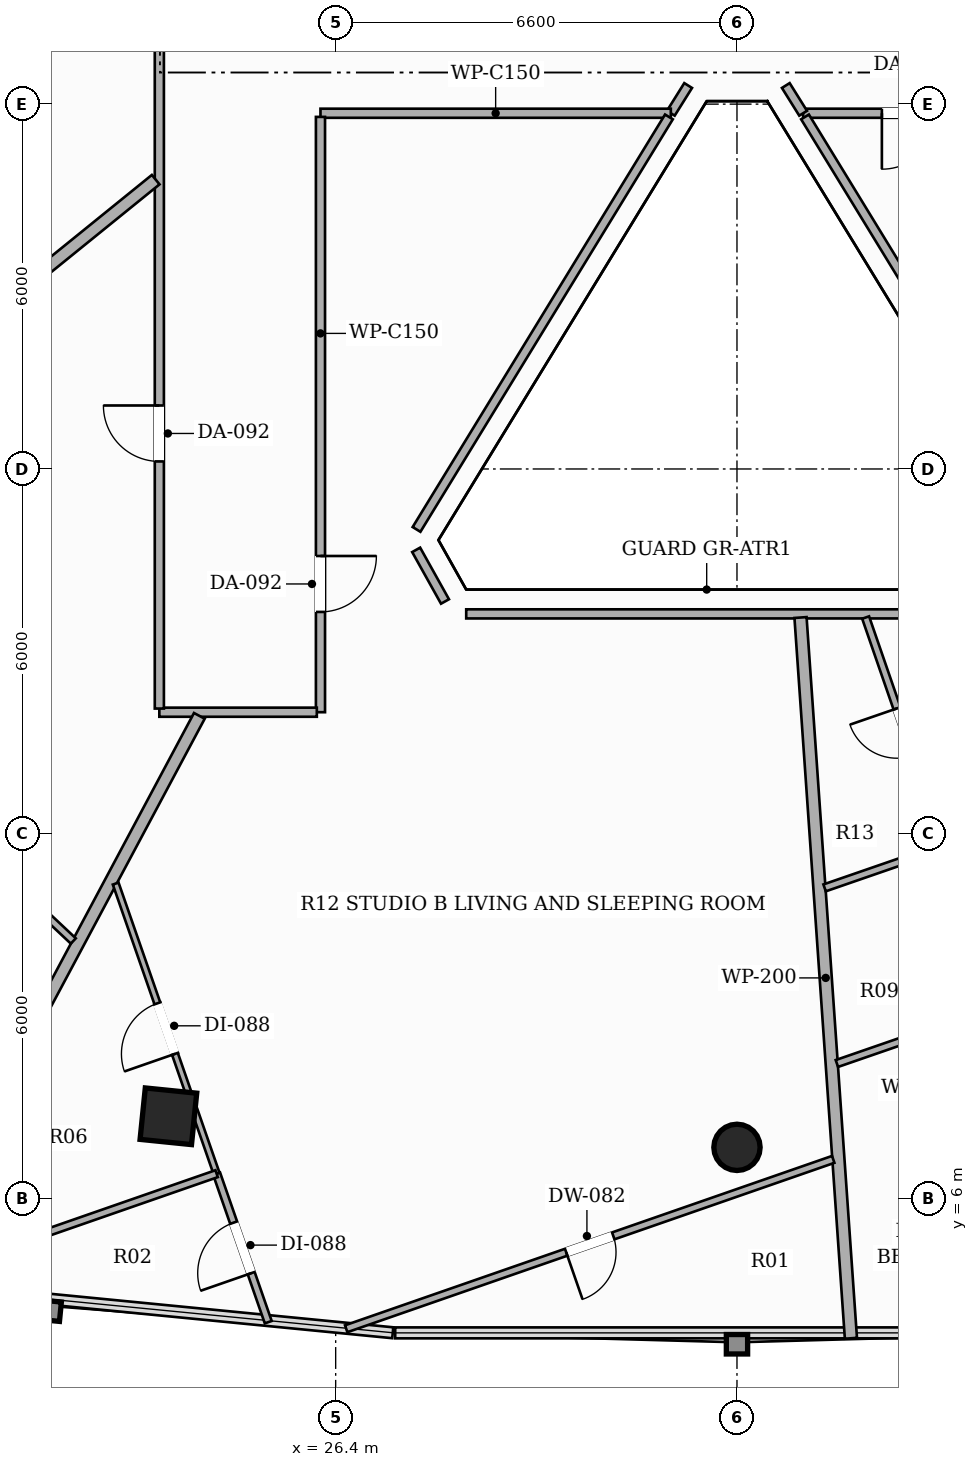
"""IFC4 building model, lengths in metres.
Left out: names, types, materials, properties, quantities, classifications, styles, units other than length and angle.
Written with IfcOpenShell. Run it as: python <this file> out.ifc"""

import sys

from ifc_helpers import new_model, si_unit, direction, frame, frame_2d, origin, origin_2d, place, context, subcontext, project, spatial, rectangle, hollow_rectangle, hollow_circle, extrude, element, fill, save


model = new_model("IFC4")
c1 = context("Model", 3, precision=1e-05, world=origin(), true_north=direction((0.0, 1.0)))
c2 = subcontext(c1, "Body", "Model", "MODEL_VIEW")
j1 = project(units=[si_unit("LENGTHUNIT", "METRE"), si_unit("PLANEANGLEUNIT", "RADIAN")], contexts=[c1])
p1 = place(None, origin())
s1 = spatial("IfcSite", under=j1, at=p1, CompositionType="ELEMENT")
p2 = place(p1, origin())
s2 = spatial("IfcBuilding", under=s1, at=p2, CompositionType="ELEMENT")
p3 = place(p2, frame((0.0, 0.0, 160.55)))
s3 = spatial("IfcBuildingStorey", under=s2, at=p3, CompositionType="ELEMENT", Elevation=160.55)
p4 = place(p3, frame((23.649, 7.355, 0.0), z_axis=(0.0, 0.0, 1.0), x_axis=(-0.994880708829, 0.101056297183, 0.0)))
e1 = element("IfcColumn", 1, at=p4, inside=s3, PredefinedType="COLUMN", context=c2, shape_type="SweptSolid", body=[
    extrude(hollow_rectangle(XDim=0.85, YDim=0.85, WallThickness=0.028, at=origin_2d()), origin(), (0.0, 0.0, 1.0), 3.3),
])
p5 = place(p3, frame((33.0, 6.844, 0.0), z_axis=(0.0, 0.0, 1.0), x_axis=(1.0, 0.0, 0.0)))
e2 = element("IfcColumn", 2, at=p5, inside=s3, PredefinedType="COLUMN", context=c2, shape_type="SweptSolid", body=[
    extrude(hollow_circle(Radius=0.381, WallThickness=0.022, at=origin_2d()), origin(), (0.0, 0.0, 1.0), 3.3),
])
p6 = place(p3, frame((32.197, 24.306, 0.0), z_axis=(0.0, 0.0, 1.0), x_axis=(-0.530039765459, -0.847972786728, 0.0)))
e3 = element("IfcWall", 3, at=p6, inside=s3, PredefinedType="PARTITIONING", context=c2, shape_type="SweptSolid", body=[
    extrude(rectangle(XDim=0.538, YDim=0.15, at=frame_2d((0.269, 0.0))), origin(), (0.0, 0.0, 1.0), 3.06),
])
p7 = place(p3, frame((31.912, 23.85, 0.0), z_axis=(0.0, 0.0, 1.0), x_axis=(-1.0, 0.0, 0.0)))
e4 = element("IfcWall", 4, at=p7, inside=s3, PredefinedType="PARTITIONING", context=c2, shape_type="SweptSolid", body=[
    extrude(rectangle(XDim=5.762, YDim=0.15, at=frame_2d((2.881, 0.0))), origin(), (0.0, 0.0, 1.0), 2.721),
])
p8 = place(p3, frame((26.15, 23.79, 0.0), z_axis=(0.0, 0.0, 1.0), x_axis=(0.0, -1.0, 0.0)))
e5 = element("IfcWall", 5, at=p8, inside=s3, PredefinedType="PARTITIONING", context=c2, shape_type="SweptSolid", body=[
    extrude(rectangle(XDim=9.79, YDim=0.15, at=frame_2d((4.895, 0.0))), origin(), (0.0, 0.0, 1.0), 2.721),
])
p9 = place(p8, frame((7.221, 0.0, 0.0)))
e6 = element("IfcOpeningElement", 6, at=p9, cuts=e5, PredefinedType="OPENING", context=c2, shape_type="SweptSolid", body=[
    extrude(rectangle(XDim=0.92, YDim=2.15, at=frame_2d((0.46, 1.075))), frame((0.0, 0.085, 0.0), z_axis=(0.0, -1.0, 0.0), x_axis=(1.0, 0.0, 0.0)), (0.0, 0.0, 1.0), 0.17),
])
p10 = place(p3, frame((26.09, 14.0, 0.0), z_axis=(0.0, 0.0, 1.0), x_axis=(-1.0, 0.0, 0.0)))
e7 = element("IfcWall", 7, at=p10, inside=s3, PredefinedType="PARTITIONING", context=c2, shape_type="SweptSolid", body=[
    extrude(rectangle(XDim=2.59, YDim=0.15, at=frame_2d((1.295, 0.0))), origin(), (0.0, 0.0, 1.0), 2.721),
])
p11 = place(p3, frame((23.5, 14.06, 0.0), z_axis=(0.0, 0.0, 1.0), x_axis=(0.0, 1.0, 0.0)))
e8 = element("IfcWall", 8, at=p11, inside=s3, PredefinedType="PARTITIONING", context=c2, shape_type="SweptSolid", body=[
    extrude(rectangle(XDim=22.84, YDim=0.15, at=frame_2d((11.42, 0.0))), origin(), (0.0, 0.0, 1.0), 2.413),
])
p12 = place(p11, frame((4.064, 0.0, 0.0)))
e9 = element("IfcOpeningElement", 9, at=p12, cuts=e8, PredefinedType="OPENING", context=c2, shape_type="SweptSolid", body=[
    extrude(rectangle(XDim=0.92, YDim=2.15, at=frame_2d((0.46, 1.075))), frame((0.0, 0.085, 0.0), z_axis=(0.0, -1.0, 0.0), x_axis=(1.0, 0.0, 0.0)), (0.0, 0.0, 1.0), 0.17),
])
p13 = place(p11, frame((13.047, 0.0, 0.0)))
e10 = element("IfcOpeningElement", 10, at=p13, cuts=e8, PredefinedType="OPENING", context=c2, shape_type="SweptSolid", body=[
    extrude(rectangle(XDim=0.88, YDim=2.1, at=frame_2d((0.44, 1.05))), frame((0.0, 0.085, 0.0), z_axis=(0.0, -1.0, 0.0), x_axis=(1.0, 0.0, 0.0)), (0.0, 0.0, 1.0), 0.17),
])
p14 = place(p11, frame((19.953, 0.0, 0.0)))
e11 = element("IfcOpeningElement", 11, at=p14, cuts=e8, PredefinedType="OPENING", context=c2, shape_type="SweptSolid", body=[
    extrude(rectangle(XDim=0.92, YDim=2.15, at=frame_2d((0.46, 1.075))), frame((0.0, 0.085, 0.0), z_axis=(0.0, -1.0, 0.0), x_axis=(1.0, 0.0, 0.0)), (0.0, 0.0, 1.0), 0.17),
])
p15 = place(p3, frame((42.29, 23.85, 0.0), z_axis=(0.0, 0.0, 1.0), x_axis=(-1.0, 0.0, 0.0)))
e12 = element("IfcWall", 12, at=p15, inside=s3, PredefinedType="PARTITIONING", context=c2, shape_type="SweptSolid", body=[
    extrude(rectangle(XDim=8.202, YDim=0.15, at=frame_2d((4.101, 0.0))), origin(), (0.0, 0.0, 1.0), 2.492),
])
p16 = place(p15, frame((5.987, 0.0, 0.0)))
e13 = element("IfcOpeningElement", 13, at=p16, cuts=e12, PredefinedType="OPENING", context=c2, shape_type="SweptSolid", body=[
    extrude(rectangle(XDim=0.92, YDim=2.15, at=frame_2d((0.46, 1.075))), frame((0.0, 0.085, 0.0), z_axis=(0.0, -1.0, 0.0), x_axis=(1.0, 0.0, 0.0)), (0.0, 0.0, 1.0), 0.17),
])
p17 = place(p15, frame((0.894, 0.0, 0.0)))
e14 = element("IfcOpeningElement", 14, at=p17, cuts=e12, PredefinedType="OPENING", context=c2, shape_type="SweptSolid", body=[
    extrude(rectangle(XDim=0.88, YDim=2.1, at=frame_2d((0.44, 1.05))), frame((0.0, 0.085, 0.0), z_axis=(0.0, -1.0, 0.0), x_axis=(1.0, 0.0, 0.0)), (0.0, 0.0, 1.0), 0.17),
])
p18 = place(p15, frame((3.169, 0.0, 0.0)))
e15 = element("IfcOpeningElement", 15, at=p18, cuts=e12, PredefinedType="OPENING", context=c2, shape_type="SweptSolid", body=[
    extrude(rectangle(XDim=0.88, YDim=2.1, at=frame_2d((0.44, 1.05))), frame((0.0, 0.085, 0.0), z_axis=(0.0, -1.0, 0.0), x_axis=(1.0, 0.0, 0.0)), (0.0, 0.0, 1.0), 0.17),
])
p19 = place(p3, frame((34.088, 23.85, 0.0), z_axis=(0.0, 0.0, 1.0), x_axis=(-0.530039765459, 0.847972786728, 0.0)))
e16 = element("IfcWall", 16, at=p19, inside=s3, PredefinedType="PARTITIONING", context=c2, shape_type="SweptSolid", body=[
    extrude(rectangle(XDim=0.538, YDim=0.15, at=frame_2d((0.269, 0.0))), origin(), (0.0, 0.0, 1.0), 3.06),
])
p20 = place(p3, frame((34.119, 23.79, 0.0), z_axis=(0.0, 0.0, 1.0), x_axis=(0.521942869651, -0.852980445744, 0.0)))
e17 = element("IfcWall", 17, at=p20, inside=s3, PredefinedType="PARTITIONING", context=c2, shape_type="SweptSolid", body=[
    extrude(rectangle(XDim=7.953, YDim=0.15, at=frame_2d((3.977, 0.0))), origin(), (0.0, 0.0, 1.0), 2.721),
])
p21 = place(p3, frame((37.453, 15.617, 0.0), z_axis=(0.0, 0.0, 1.0), x_axis=(-1.0, 0.0, 0.0)))
e18 = element("IfcWall", 18, at=p21, inside=s3, PredefinedType="PARTITIONING", context=c2, shape_type="SweptSolid", body=[
    extrude(rectangle(XDim=8.906, YDim=0.15, at=frame_2d((4.453, 0.0))), origin(), (0.0, 0.0, 1.0), 2.721),
])
p22 = place(p3, frame((28.198, 15.821, 0.0), z_axis=(0.0, 0.0, 1.0), x_axis=(-0.487432951818, 0.873160419099, 0.0)))
e19 = element("IfcWall", 19, at=p22, inside=s3, PredefinedType="PARTITIONING", context=c2, shape_type="SweptSolid", body=[
    extrude(rectangle(XDim=0.972, YDim=0.15, at=frame_2d((0.486, 0.0))), origin(), (0.0, 0.0, 1.0), 3.06),
])
p23 = place(p3, frame((27.73, 17.006, 0.0), z_axis=(0.0, 0.0, 1.0), x_axis=(0.521942869651, 0.852980445744, 0.0)))
e20 = element("IfcWall", 20, at=p23, inside=s3, PredefinedType="PARTITIONING", context=c2, shape_type="SweptSolid", body=[
    extrude(rectangle(XDim=7.953, YDim=0.15, at=frame_2d((3.977, 0.0))), origin(), (0.0, 0.0, 1.0), 2.721),
])
p24 = place(p3, frame((34.874, 3.704, 0.0), z_axis=(0.0, 0.0, 1.0), x_axis=(-0.069779440561, 0.997562443998, 0.0)))
e21 = element("IfcWall", 21, at=p24, inside=s3, PredefinedType="PARTITIONING", context=c2, shape_type="SweptSolid", body=[
    extrude(rectangle(XDim=11.882, YDim=0.2, at=frame_2d((5.941, 0.0))), origin(), (0.0, 0.0, 1.0), 2.413),
])
p25 = place(p3, frame((19.145, 4.55, 0.0), z_axis=(0.0, 0.0, 1.0), x_axis=(0.470953669838, 0.882157945533, 0.0)))
e22 = element("IfcWall", 22, at=p25, inside=s3, PredefinedType="PARTITIONING", context=c2, shape_type="SweptSolid", body=[
    extrude(rectangle(XDim=10.644, YDim=0.2, at=frame_2d((5.322, 0.0))), origin(), (0.0, 0.0, 1.0), 2.413),
])
p26 = place(p3, frame((8.887, 10.973, 0.0), z_axis=(0.0, 0.0, 1.0), x_axis=(0.777135864284, 0.629332859815, 0.0)))
e23 = element("IfcWall", 23, at=p26, inside=s3, PredefinedType="PARTITIONING", context=c2, shape_type="SweptSolid", body=[
    extrude(rectangle(XDim=18.726, YDim=0.2, at=frame_2d((9.363, 0.0))), origin(), (0.0, 0.0, 1.0), 2.413),
])
p27 = place(p3, frame((36.417, 11.794, 0.0), z_axis=(0.0, 0.0, 1.0), x_axis=(-0.326767254884, 0.945104841346, 0.0)))
e24 = element("IfcWall", 24, at=p27, inside=s3, PredefinedType="PARTITIONING", context=c2, shape_type="SweptSolid", body=[
    extrude(rectangle(XDim=3.981, YDim=0.12, at=frame_2d((1.991, 0.0))), origin(), (0.0, 0.0, 1.0), 3.06),
])
p28 = place(p27, frame((1.581, 0.0, 0.0)))
e25 = element("IfcOpeningElement", 25, at=p28, cuts=e24, PredefinedType="OPENING", context=c2, shape_type="SweptSolid", body=[
    extrude(rectangle(XDim=0.82, YDim=2.1, at=frame_2d((0.41, 1.05))), frame((0.0, 0.07, 0.0), z_axis=(0.0, -1.0, 0.0), x_axis=(1.0, 0.0, 0.0)), (0.0, 0.0, 1.0), 0.14),
])
p29 = place(p3, frame((36.417, 11.794, 0.0), z_axis=(0.0, 0.0, 1.0), x_axis=(-0.945158093584, -0.326613193446, 0.0)))
e26 = element("IfcWall", 26, at=p29, inside=s3, PredefinedType="PARTITIONING", context=c2, shape_type="SweptSolid", body=[
    extrude(rectangle(XDim=2.091, YDim=0.12, at=frame_2d((1.045, 0.0))), origin(), (0.0, 0.0, 1.0), 3.06),
])
p30 = place(p3, frame((37.33, 9.152, 0.0), z_axis=(0.0, 0.0, 1.0), x_axis=(-0.945086078656, -0.326821516933, 0.0)))
e27 = element("IfcWall", 27, at=p30, inside=s3, PredefinedType="PARTITIONING", context=c2, shape_type="SweptSolid", body=[
    extrude(rectangle(XDim=2.843, YDim=0.12, at=frame_2d((1.422, 0.0))), origin(), (0.0, 0.0, 1.0), 2.721),
])
p31 = place(p3, frame((34.583, 6.646, 0.0), z_axis=(0.0, 0.0, 1.0), x_axis=(-0.944539899325, -0.328396678704, 0.0)))
e28 = element("IfcWall", 28, at=p31, inside=s3, PredefinedType="PARTITIONING", context=c2, shape_type="SweptSolid", body=[
    extrude(rectangle(XDim=8.48, YDim=0.12, at=frame_2d((4.24, 0.0))), origin(), (0.0, 0.0, 1.0), 2.413),
])
p32 = place(p31, frame((3.83, 0.0, 0.0)))
e29 = element("IfcOpeningElement", 29, at=p32, cuts=e28, PredefinedType="OPENING", context=c2, shape_type="SweptSolid", body=[
    extrude(rectangle(XDim=0.82, YDim=2.1, at=frame_2d((0.41, 1.05))), frame((0.0, 0.07, 0.0), z_axis=(0.0, -1.0, 0.0), x_axis=(1.0, 0.0, 0.0)), (0.0, 0.0, 1.0), 0.14),
])
p33 = place(p3, frame((25.291, 3.969, 0.0), z_axis=(0.0, 0.0, 1.0), x_axis=(-0.328440044658, 0.944524820778, 0.0)))
e30 = element("IfcWall", 30, at=p33, inside=s3, PredefinedType="PARTITIONING", context=c2, shape_type="SweptSolid", body=[
    extrude(rectangle(XDim=2.585, YDim=0.12, at=frame_2d((1.292, 0.0))), origin(), (0.0, 0.0, 1.0), 3.06),
])
p34 = place(p33, frame((0.853, 0.0, 0.0)))
e31 = element("IfcOpeningElement", 31, at=p34, cuts=e30, PredefinedType="OPENING", context=c2, shape_type="SweptSolid", body=[
    extrude(rectangle(XDim=0.88, YDim=2.1, at=frame_2d((0.44, 1.05))), frame((0.0, 0.07, 0.0), z_axis=(0.0, -1.0, 0.0), x_axis=(1.0, 0.0, 0.0)), (0.0, 0.0, 1.0), 0.14),
])
p35 = place(p3, frame((24.442, 6.411, 0.0), z_axis=(0.0, 0.0, 1.0), x_axis=(-0.328597479572, 0.944470061155, 0.0)))
e32 = element("IfcWall", 32, at=p35, inside=s3, PredefinedType="PARTITIONING", context=c2, shape_type="SweptSolid", body=[
    extrude(rectangle(XDim=5.052, YDim=0.1, at=frame_2d((2.526, 0.0))), origin(), (0.0, 0.0, 1.0), 2.413),
])
p36 = place(p35, frame((2.086, 0.0, 0.0)))
e33 = element("IfcOpeningElement", 33, at=p36, cuts=e32, PredefinedType="OPENING", context=c2, shape_type="SweptSolid", body=[
    extrude(rectangle(XDim=0.88, YDim=2.1, at=frame_2d((0.44, 1.05))), frame((0.0, 0.06, 0.0), z_axis=(0.0, -1.0, 0.0), x_axis=(1.0, 0.0, 0.0)), (0.0, 0.0, 1.0), 0.12),
])
p37 = place(p3, frame((19.276, 4.614, 0.0), z_axis=(0.0, 0.0, 1.0), x_axis=(0.944496796706, 0.328520624941, 0.0)))
e34 = element("IfcWall", 34, at=p37, inside=s3, PredefinedType="PARTITIONING", context=c2, shape_type="SweptSolid", body=[
    extrude(rectangle(XDim=5.469, YDim=0.12, at=frame_2d((2.735, 0.0))), origin(), (0.0, 0.0, 1.0), 2.619),
])
p38 = place(p3, frame((22.085, 10.238, 0.0), z_axis=(0.0, 0.0, 1.0), x_axis=(-0.728663547615, 0.684871837921, 0.0)))
e35 = element("IfcWall", 35, at=p38, inside=s3, PredefinedType="PARTITIONING", context=c2, shape_type="SweptSolid", body=[
    extrude(rectangle(XDim=2.241, YDim=0.12, at=frame_2d((1.121, 0.0))), origin(), (0.0, 0.0, 1.0), 2.721),
])
p39 = place(p16, origin())
e36 = element("IfcDoor", 36, at=p39, inside=s3, OperationType="SINGLE_SWING_RIGHT", PredefinedType="DOOR", context=c2, shape_type="SweptSolid", body=[
    extrude(rectangle(XDim=0.92, YDim=2.15, at=frame_2d((0.46, 1.075))), frame((0.0, 0.025, 0.0), z_axis=(0.0, -1.0, 0.0), x_axis=(1.0, 0.0, 0.0)), (0.0, 0.0, 1.0), 0.05),
])
fill(e13, e36)
p40 = place(p28, origin())
e37 = element("IfcDoor", 37, at=p40, inside=s3, OperationType="SINGLE_SWING_RIGHT", PredefinedType="DOOR", context=c2, shape_type="SweptSolid", body=[
    extrude(rectangle(XDim=0.82, YDim=2.1, at=frame_2d((0.41, 1.05))), frame((0.0, 0.025, 0.0), z_axis=(0.0, -1.0, 0.0), x_axis=(1.0, 0.0, 0.0)), (0.0, 0.0, 1.0), 0.05),
])
fill(e25, e37)
p41 = place(p9, origin())
e38 = element("IfcDoor", 38, at=p41, inside=s3, OperationType="SINGLE_SWING_LEFT", PredefinedType="DOOR", context=c2, shape_type="SweptSolid", body=[
    extrude(rectangle(XDim=0.92, YDim=2.15, at=frame_2d((0.46, 1.075))), frame((0.0, 0.025, 0.0), z_axis=(0.0, -1.0, 0.0), x_axis=(1.0, 0.0, 0.0)), (0.0, 0.0, 1.0), 0.05),
])
fill(e6, e38)
p42 = place(p32, origin())
e39 = element("IfcDoor", 39, at=p42, inside=s3, OperationType="SINGLE_SWING_RIGHT", PredefinedType="DOOR", context=c2, shape_type="SweptSolid", body=[
    extrude(rectangle(XDim=0.82, YDim=2.1, at=frame_2d((0.41, 1.05))), frame((0.0, 0.025, 0.0), z_axis=(0.0, -1.0, 0.0), x_axis=(1.0, 0.0, 0.0)), (0.0, 0.0, 1.0), 0.05),
])
fill(e29, e39)
p43 = place(p34, origin())
e40 = element("IfcDoor", 40, at=p43, inside=s3, OperationType="SINGLE_SWING_LEFT", PredefinedType="DOOR", context=c2, shape_type="SweptSolid", body=[
    extrude(rectangle(XDim=0.88, YDim=2.1, at=frame_2d((0.44, 1.05))), frame((0.0, 0.025, 0.0), z_axis=(0.0, -1.0, 0.0), x_axis=(1.0, 0.0, 0.0)), (0.0, 0.0, 1.0), 0.05),
])
fill(e31, e40)
p44 = place(p36, origin())
e41 = element("IfcDoor", 41, at=p44, inside=s3, OperationType="SINGLE_SWING_LEFT", PredefinedType="DOOR", context=c2, shape_type="SweptSolid", body=[
    extrude(rectangle(XDim=0.88, YDim=2.1, at=frame_2d((0.44, 1.05))), frame((0.0, 0.025, 0.0), z_axis=(0.0, -1.0, 0.0), x_axis=(1.0, 0.0, 0.0)), (0.0, 0.0, 1.0), 0.05),
])
fill(e33, e41)
p45 = place(p12, origin())
e42 = element("IfcDoor", 42, at=p45, inside=s3, OperationType="SINGLE_SWING_RIGHT", PredefinedType="DOOR", context=c2, shape_type="SweptSolid", body=[
    extrude(rectangle(XDim=0.92, YDim=2.15, at=frame_2d((0.46, 1.075))), frame((0.0, 0.025, 0.0), z_axis=(0.0, -1.0, 0.0), x_axis=(1.0, 0.0, 0.0)), (0.0, 0.0, 1.0), 0.05),
])
fill(e9, e42)
save(model, sys.argv[1])
